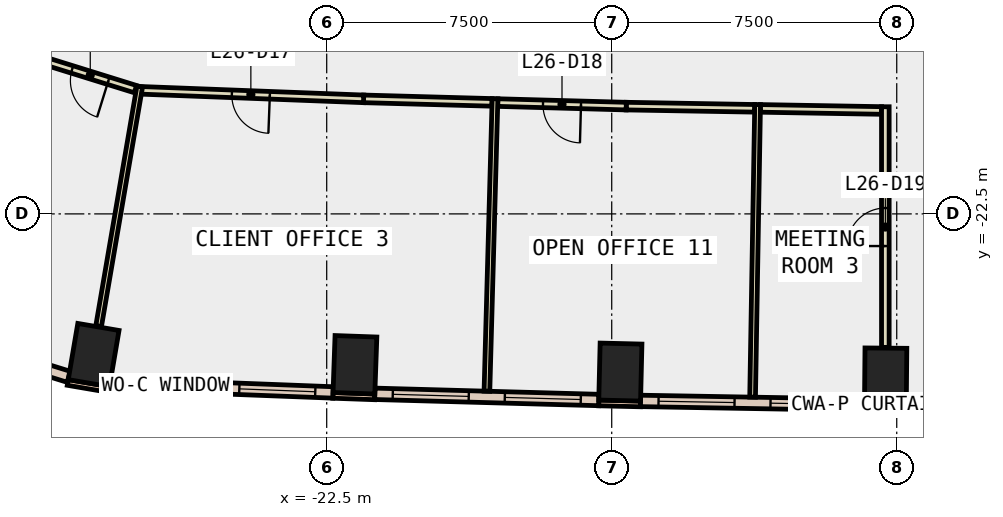
"""IFC4 building model, lengths in metres.
Left out: names, types, materials, properties, quantities, classifications, styles, units other than length and angle.
Written with IfcOpenShell. Run it as: python <this file> out.ifc"""

import sys

from ifc_helpers import new_model, si_unit, direction, frame, frame_2d, origin, origin_2d, place, context, subcontext, project, spatial, rectangle, extrude, element, fill, save


model = new_model("IFC4")
c1 = context("Model", 3, precision=1e-05, world=origin(), true_north=direction((0.0, 1.0)))
c2 = subcontext(c1, "Body", "Model", "MODEL_VIEW")
j1 = project(units=[si_unit("LENGTHUNIT", "METRE"), si_unit("PLANEANGLEUNIT", "RADIAN")], contexts=[c1])
p1 = place(None, origin())
s1 = spatial("IfcSite", under=j1, at=p1, CompositionType="ELEMENT")
p2 = place(p1, origin())
s2 = spatial("IfcBuilding", under=s1, at=p2, CompositionType="ELEMENT")
p3 = place(p2, frame((0.0, 0.0, 120.2)))
s3 = spatial("IfcBuildingStorey", under=s2, at=p3, CompositionType="ELEMENT", Elevation=120.2)
for number, where, z_axis, x_axis in (
    (1, (-28.633, -26.214, -0.4), (0.0, 0.0, 1.0), (-0.986, 0.168, 0.0)),
    (2, (-21.757, -26.47, -0.4), (0.0, 0.0, 1.0), (-0.999, 0.035, 0.0)),
    (3, (-14.773, -26.662, -0.4), (0.0, 0.0, 1.0), (-1.0, 0.024, 0.0)),
    (4, (-7.792, -26.782, -0.4), (0.0, 0.0, 1.0), (-1.0, 0.009, 0.0)),
):
    element("IfcColumn", number, at=place(p3, frame(where, z_axis=z_axis, x_axis=x_axis)), inside=s3, PredefinedType="COLUMN", context=c2, shape_type="SweptSolid", body=[
        extrude(rectangle(XDim=1.1, YDim=1.5, at=origin_2d()), origin(), (0.0, 0.0, 1.0), 4.2),
    ])
p4 = place(p3, frame((-29.314, -26.935, 0.0), z_axis=(0.0, 0.0, 1.0), x_axis=(0.985763338892, -0.168138751323, 0.0)))
e5 = element("IfcWall", 5, at=p4, inside=s3, PredefinedType="STANDARD", context=c2, shape_type="SweptSolid", body=[
    extrude(rectangle(XDim=1.101, YDim=0.15, at=frame_2d((0.55, 0.0))), origin(), (0.0, 0.0, 1.0), 3.8),
])
p5 = place(p3, frame((-22.336, -27.275, 0.0), z_axis=(0.0, 0.0, 1.0), x_axis=(0.999368780235, -0.035525217693, 0.0)))
e6 = element("IfcWall", 6, at=p5, inside=s3, PredefinedType="STANDARD", context=c2, shape_type="SweptSolid", body=[
    extrude(rectangle(XDim=1.1, YDim=0.15, at=frame_2d((0.55, 0.0))), origin(), (0.0, 0.0, 1.0), 3.8),
])
p6 = place(p3, frame((-15.343, -27.474, 0.0), z_axis=(0.0, 0.0, 1.0), x_axis=(0.999723421029, -0.023517683673, 0.0)))
e7 = element("IfcWall", 7, at=p6, inside=s3, PredefinedType="STANDARD", context=c2, shape_type="SweptSolid", body=[
    extrude(rectangle(XDim=1.1, YDim=0.15, at=frame_2d((0.55, 0.0))), origin(), (0.0, 0.0, 1.0), 3.8),
])
p7 = place(p3, frame((-8.349, -27.602, 0.0), z_axis=(0.0, 0.0, 1.0), x_axis=(0.99995860686, -0.009098602504, 0.0)))
e8 = element("IfcWall", 8, at=p7, inside=s3, PredefinedType="STANDARD", context=c2, shape_type="SweptSolid", body=[
    extrude(rectangle(XDim=1.1, YDim=0.15, at=frame_2d((0.55, 0.0))), origin(), (0.0, 0.0, 1.0), 3.8),
])
p8 = place(p3, frame((-28.205, -26.973, 0.0), z_axis=(0.0, 0.0, 1.0), x_axis=(0.999266319694, -0.03829911651, 0.0)))
e9 = element("IfcWall", 9, at=p8, inside=s3, PredefinedType="STANDARD", context=c2, shape_type="SweptSolid", body=[
    extrude(rectangle(XDim=5.877, YDim=0.3, at=frame_2d((2.939, 0.0))), origin(), (0.0, 0.0, 1.0), 3.8),
])
p9 = place(p8, frame((0.469, 0.0, 0.9)))
e10 = element("IfcOpeningElement", 10, at=p9, cuts=e9, PredefinedType="OPENING", context=c2, shape_type="SweptSolid", body=[
    extrude(rectangle(XDim=2.0, YDim=2.6, at=frame_2d((1.0, 1.3))), frame((0.0, 0.16, 0.0), z_axis=(0.0, -1.0, 0.0), x_axis=(1.0, 0.0, 0.0)), (0.0, 0.0, 1.0), 0.32),
])
p10 = place(p8, frame((3.408, 0.0, 0.9)))
e11 = element("IfcOpeningElement", 11, at=p10, cuts=e9, PredefinedType="OPENING", context=c2, shape_type="SweptSolid", body=[
    extrude(rectangle(XDim=2.0, YDim=2.6, at=frame_2d((1.0, 1.3))), frame((0.0, 0.16, 0.0), z_axis=(0.0, -1.0, 0.0), x_axis=(1.0, 0.0, 0.0)), (0.0, 0.0, 1.0), 0.32),
])
p11 = place(p3, frame((-21.235, -27.234, 0.0), z_axis=(0.0, 0.0, 1.0), x_axis=(0.999617542368, -0.027654456983, 0.0)))
e12 = element("IfcWall", 12, at=p11, inside=s3, PredefinedType="STANDARD", context=c2, shape_type="SweptSolid", body=[
    extrude(rectangle(XDim=5.897, YDim=0.3, at=frame_2d((2.949, 0.0))), origin(), (0.0, 0.0, 1.0), 3.8),
])
p12 = place(p11, frame((0.474, 0.0, 0.9)))
e13 = element("IfcOpeningElement", 13, at=p12, cuts=e12, PredefinedType="OPENING", context=c2, shape_type="SweptSolid", body=[
    extrude(rectangle(XDim=2.0, YDim=2.6, at=frame_2d((1.0, 1.3))), frame((0.0, 0.16, 0.0), z_axis=(0.0, -1.0, 0.0), x_axis=(1.0, 0.0, 0.0)), (0.0, 0.0, 1.0), 0.32),
])
p13 = place(p11, frame((3.423, 0.0, 0.9)))
e14 = element("IfcOpeningElement", 14, at=p13, cuts=e12, PredefinedType="OPENING", context=c2, shape_type="SweptSolid", body=[
    extrude(rectangle(XDim=2.0, YDim=2.6, at=frame_2d((1.0, 1.3))), frame((0.0, 0.16, 0.0), z_axis=(0.0, -1.0, 0.0), x_axis=(1.0, 0.0, 0.0)), (0.0, 0.0, 1.0), 0.32),
])
p14 = place(p3, frame((-14.242, -27.421, 0.0), z_axis=(0.0, 0.0, 1.0), x_axis=(0.999850142513, -0.017311629508, 0.0)))
e15 = element("IfcWall", 15, at=p14, inside=s3, PredefinedType="STANDARD", context=c2, shape_type="SweptSolid", body=[
    extrude(rectangle(XDim=5.895, YDim=0.3, at=frame_2d((2.948, 0.0))), origin(), (0.0, 0.0, 1.0), 3.8),
])
p15 = place(p14, frame((0.474, 0.0, 0.9)))
e16 = element("IfcOpeningElement", 16, at=p15, cuts=e15, PredefinedType="OPENING", context=c2, shape_type="SweptSolid", body=[
    extrude(rectangle(XDim=2.0, YDim=2.6, at=frame_2d((1.0, 1.3))), frame((0.0, 0.16, 0.0), z_axis=(0.0, -1.0, 0.0), x_axis=(1.0, 0.0, 0.0)), (0.0, 0.0, 1.0), 0.32),
])
p16 = place(p14, frame((3.421, 0.0, 0.9)))
e17 = element("IfcOpeningElement", 17, at=p16, cuts=e15, PredefinedType="OPENING", context=c2, shape_type="SweptSolid", body=[
    extrude(rectangle(XDim=2.0, YDim=2.6, at=frame_2d((1.0, 1.3))), frame((0.0, 0.16, 0.0), z_axis=(0.0, -1.0, 0.0), x_axis=(1.0, 0.0, 0.0)), (0.0, 0.0, 1.0), 0.32),
])
p17 = place(p3, frame((-33.294, -25.542, 0.0), z_axis=(0.0, 0.0, 1.0), x_axis=(0.954955020021, -0.296750585066, 0.0)))
e18 = element("IfcWall", 18, at=p17, inside=s3, PredefinedType="STANDARD", context=c2, shape_type="SweptSolid", body=[
    extrude(rectangle(XDim=4.196, YDim=0.3, at=frame_2d((2.098, 0.0))), origin(), (0.0, 0.0, 1.0), 3.8),
])
p18 = place(p17, frame((1.398, 0.0, 0.9)))
e19 = element("IfcOpeningElement", 19, at=p18, cuts=e18, PredefinedType="OPENING", context=c2, shape_type="SweptSolid", body=[
    extrude(rectangle(XDim=1.4, YDim=2.6, at=frame_2d((0.7, 1.3))), frame((0.0, 0.16, 0.0), z_axis=(0.0, -1.0, 0.0), x_axis=(1.0, 0.0, 0.0)), (0.0, 0.0, 1.0), 0.32),
])
p19 = place(p3, frame((-27.533, -19.217, 0.0), z_axis=(0.0, 0.0, 1.0), x_axis=(-0.954946345159, 0.296778499671, 0.0)))
e20 = element("IfcWall", 20, at=p19, inside=s3, PredefinedType="PARTITIONING", context=c2, shape_type="SweptSolid", body=[
    extrude(rectangle(XDim=2.49, YDim=0.2, at=frame_2d((1.245, 0.0))), origin(), (0.0, 0.0, 1.0), 3.8),
])
p20 = place(p19, frame((0.745, 0.0, 0.0)))
e21 = element("IfcOpeningElement", 21, at=p20, cuts=e20, PredefinedType="OPENING", context=c2, shape_type="SweptSolid", body=[
    extrude(rectangle(XDim=1.0, YDim=2.1, at=frame_2d((0.5, 1.05))), frame((0.0, 0.11, 0.0), z_axis=(0.0, -1.0, 0.0), x_axis=(1.0, 0.0, 0.0)), (0.0, 0.0, 1.0), 0.22),
])
p21 = place(p3, frame((-18.149, -19.566, 0.0), z_axis=(0.0, 0.0, 1.0), x_axis=(-0.999621568347, 0.027508545868, 0.0)))
e22 = element("IfcWall", 22, at=p21, inside=s3, PredefinedType="PARTITIONING", context=c2, shape_type="SweptSolid", body=[
    extrude(rectangle(XDim=3.381, YDim=0.2, at=frame_2d((1.691, 0.0))), origin(), (0.0, 0.0, 1.0), 3.8),
])
p22 = place(p3, frame((-21.529, -19.473, 0.0), z_axis=(0.0, 0.0, 1.0), x_axis=(-0.999270076349, 0.038200975307, 0.0)))
e23 = element("IfcWall", 23, at=p22, inside=s3, PredefinedType="PARTITIONING", context=c2, shape_type="SweptSolid", body=[
    extrude(rectangle(XDim=5.937, YDim=0.2, at=frame_2d((2.969, 0.0))), origin(), (0.0, 0.0, 1.0), 3.8),
])
p23 = place(p22, frame((2.469, 0.0, 0.0)))
e24 = element("IfcOpeningElement", 24, at=p23, cuts=e23, PredefinedType="OPENING", context=c2, shape_type="SweptSolid", body=[
    extrude(rectangle(XDim=1.0, YDim=2.1, at=frame_2d((0.5, 1.05))), frame((0.0, 0.11, 0.0), z_axis=(0.0, -1.0, 0.0), x_axis=(1.0, 0.0, 0.0)), (0.0, 0.0, 1.0), 0.22),
])
p24 = place(p3, frame((-11.237, -19.722, 0.0), z_axis=(0.0, 0.0, 1.0), x_axis=(-0.999853581081, 0.017111878879, 0.0)))
e25 = element("IfcWall", 25, at=p24, inside=s3, PredefinedType="PARTITIONING", context=c2, shape_type="SweptSolid", body=[
    extrude(rectangle(XDim=3.381, YDim=0.2, at=frame_2d((1.691, 0.0))), origin(), (0.0, 0.0, 1.0), 3.8),
])
p25 = place(p3, frame((-14.618, -19.664, 0.0), z_axis=(0.0, 0.0, 1.0), x_axis=(-0.999621786796, 0.027500606598, 0.0)))
e26 = element("IfcWall", 26, at=p25, inside=s3, PredefinedType="PARTITIONING", context=c2, shape_type="SweptSolid", body=[
    extrude(rectangle(XDim=3.382, YDim=0.2, at=frame_2d((1.691, 0.0))), origin(), (0.0, 0.0, 1.0), 3.8),
])
p26 = place(p25, frame((1.191, 0.0, 0.0)))
e27 = element("IfcOpeningElement", 27, at=p26, cuts=e26, PredefinedType="OPENING", context=c2, shape_type="SweptSolid", body=[
    extrude(rectangle(XDim=1.0, YDim=2.1, at=frame_2d((0.5, 1.05))), frame((0.0, 0.11, 0.0), z_axis=(0.0, -1.0, 0.0), x_axis=(1.0, 0.0, 0.0)), (0.0, 0.0, 1.0), 0.22),
])
p27 = place(p3, frame((-7.9, -19.779, 0.0), z_axis=(0.0, 0.0, 1.0), x_axis=(-0.999851582532, 0.017228259004, 0.0)))
e28 = element("IfcWall", 28, at=p27, inside=s3, PredefinedType="PARTITIONING", context=c2, shape_type="SweptSolid", body=[
    extrude(rectangle(XDim=3.188, YDim=0.2, at=frame_2d((1.594, 0.0))), origin(), (0.0, 0.0, 1.0), 3.8),
])
p28 = place(p3, frame((-7.8, -26.012, 0.0), z_axis=(0.0, 0.0, 1.0), x_axis=(0.0, 1.0, 0.0)))
e29 = element("IfcWall", 29, at=p28, inside=s3, PredefinedType="PARTITIONING", context=c2, shape_type="SweptSolid", body=[
    extrude(rectangle(XDim=6.331, YDim=0.2, at=frame_2d((3.166, 0.0))), origin(), (0.0, 0.0, 1.0), 3.8),
])
p29 = place(p28, frame((2.666, 0.0, 0.0)))
e30 = element("IfcOpeningElement", 30, at=p29, cuts=e29, PredefinedType="OPENING", context=c2, shape_type="SweptSolid", body=[
    extrude(rectangle(XDim=1.0, YDim=2.1, at=frame_2d((0.5, 1.05))), frame((0.0, 0.11, 0.0), z_axis=(0.0, -1.0, 0.0), x_axis=(1.0, 0.0, 0.0)), (0.0, 0.0, 1.0), 0.22),
])
p30 = place(p3, frame((-27.42, -19.148, 0.0), z_axis=(0.0, 0.0, 1.0), x_axis=(-0.169086648341, -0.985601189809, 0.0)))
e31 = element("IfcWall", 31, at=p30, inside=s3, PredefinedType="PARTITIONING", context=c2, shape_type="SweptSolid", body=[
    extrude(rectangle(XDim=6.399, YDim=0.15, at=frame_2d((3.2, 0.0))), origin(), (0.0, 0.0, 1.0), 3.8),
])
p31 = place(p3, frame((-18.071, -19.469, 0.0), z_axis=(0.0, 0.0, 1.0), x_axis=(-0.027648258523, -0.999617713829, 0.0)))
e32 = element("IfcWall", 32, at=p31, inside=s3, PredefinedType="PARTITIONING", context=c2, shape_type="SweptSolid", body=[
    extrude(rectangle(XDim=7.7, YDim=0.15, at=frame_2d((3.85, 0.0))), origin(), (0.0, 0.0, 1.0), 3.8),
])
p32 = place(p3, frame((-11.161, -19.623, 0.0), z_axis=(0.0, 0.0, 1.0), x_axis=(-0.017153017473, -0.999852876173, 0.0)))
e33 = element("IfcWall", 33, at=p32, inside=s3, PredefinedType="PARTITIONING", context=c2, shape_type="SweptSolid", body=[
    extrude(rectangle(XDim=7.7, YDim=0.15, at=frame_2d((3.85, 0.0))), origin(), (0.0, 0.0, 1.0), 3.8),
])
p33 = place(p9, origin())
e34 = element("IfcWindow", 34, at=p33, inside=s3, PartitioningType="SINGLE_PANEL", PredefinedType="WINDOW", context=c2, shape_type="SweptSolid", body=[
    extrude(rectangle(XDim=2.0, YDim=2.6, at=frame_2d((1.0, 1.3))), frame((0.0, 0.03, 0.0), z_axis=(0.0, -1.0, 0.0), x_axis=(1.0, 0.0, 0.0)), (0.0, 0.0, 1.0), 0.06),
])
fill(e10, e34)
p34 = place(p10, origin())
e35 = element("IfcWindow", 35, at=p34, inside=s3, PartitioningType="SINGLE_PANEL", PredefinedType="WINDOW", context=c2, shape_type="SweptSolid", body=[
    extrude(rectangle(XDim=2.0, YDim=2.6, at=frame_2d((1.0, 1.3))), frame((0.0, 0.03, 0.0), z_axis=(0.0, -1.0, 0.0), x_axis=(1.0, 0.0, 0.0)), (0.0, 0.0, 1.0), 0.06),
])
fill(e11, e35)
p35 = place(p12, origin())
e36 = element("IfcWindow", 36, at=p35, inside=s3, PartitioningType="SINGLE_PANEL", PredefinedType="WINDOW", context=c2, shape_type="SweptSolid", body=[
    extrude(rectangle(XDim=2.0, YDim=2.6, at=frame_2d((1.0, 1.3))), frame((0.0, 0.03, 0.0), z_axis=(0.0, -1.0, 0.0), x_axis=(1.0, 0.0, 0.0)), (0.0, 0.0, 1.0), 0.06),
])
fill(e13, e36)
p36 = place(p13, origin())
e37 = element("IfcWindow", 37, at=p36, inside=s3, PartitioningType="SINGLE_PANEL", PredefinedType="WINDOW", context=c2, shape_type="SweptSolid", body=[
    extrude(rectangle(XDim=2.0, YDim=2.6, at=frame_2d((1.0, 1.3))), frame((0.0, 0.03, 0.0), z_axis=(0.0, -1.0, 0.0), x_axis=(1.0, 0.0, 0.0)), (0.0, 0.0, 1.0), 0.06),
])
fill(e14, e37)
p37 = place(p15, origin())
e38 = element("IfcWindow", 38, at=p37, inside=s3, PartitioningType="SINGLE_PANEL", PredefinedType="WINDOW", context=c2, shape_type="SweptSolid", body=[
    extrude(rectangle(XDim=2.0, YDim=2.6, at=frame_2d((1.0, 1.3))), frame((0.0, 0.03, 0.0), z_axis=(0.0, -1.0, 0.0), x_axis=(1.0, 0.0, 0.0)), (0.0, 0.0, 1.0), 0.06),
])
fill(e16, e38)
p38 = place(p16, origin())
e39 = element("IfcWindow", 39, at=p38, inside=s3, PartitioningType="SINGLE_PANEL", PredefinedType="WINDOW", context=c2, shape_type="SweptSolid", body=[
    extrude(rectangle(XDim=2.0, YDim=2.6, at=frame_2d((1.0, 1.3))), frame((0.0, 0.03, 0.0), z_axis=(0.0, -1.0, 0.0), x_axis=(1.0, 0.0, 0.0)), (0.0, 0.0, 1.0), 0.06),
])
fill(e17, e39)
p39 = place(p20, origin())
e40 = element("IfcDoor", 40, at=p39, inside=s3, OperationType="SINGLE_SWING_LEFT", PredefinedType="DOOR", context=c2, shape_type="SweptSolid", body=[
    extrude(rectangle(XDim=1.0, YDim=2.1, at=frame_2d((0.5, 1.05))), frame((0.0, 0.025, 0.0), z_axis=(0.0, -1.0, 0.0), x_axis=(1.0, 0.0, 0.0)), (0.0, 0.0, 1.0), 0.05),
])
fill(e21, e40)
p40 = place(p23, origin())
e41 = element("IfcDoor", 41, at=p40, inside=s3, OperationType="SINGLE_SWING_LEFT", PredefinedType="DOOR", context=c2, shape_type="SweptSolid", body=[
    extrude(rectangle(XDim=1.0, YDim=2.1, at=frame_2d((0.5, 1.05))), frame((0.0, 0.025, 0.0), z_axis=(0.0, -1.0, 0.0), x_axis=(1.0, 0.0, 0.0)), (0.0, 0.0, 1.0), 0.05),
])
fill(e24, e41)
p41 = place(p26, origin())
e42 = element("IfcDoor", 42, at=p41, inside=s3, OperationType="SINGLE_SWING_LEFT", PredefinedType="DOOR", context=c2, shape_type="SweptSolid", body=[
    extrude(rectangle(XDim=1.0, YDim=2.1, at=frame_2d((0.5, 1.05))), frame((0.0, 0.025, 0.0), z_axis=(0.0, -1.0, 0.0), x_axis=(1.0, 0.0, 0.0)), (0.0, 0.0, 1.0), 0.05),
])
fill(e27, e42)
p42 = place(p29, origin())
e43 = element("IfcDoor", 43, at=p42, inside=s3, OperationType="SINGLE_SWING_LEFT", PredefinedType="DOOR", context=c2, shape_type="SweptSolid", body=[
    extrude(rectangle(XDim=1.0, YDim=2.1, at=frame_2d((0.5, 1.05))), frame((0.0, 0.025, 0.0), z_axis=(0.0, -1.0, 0.0), x_axis=(1.0, 0.0, 0.0)), (0.0, 0.0, 1.0), 0.05),
])
fill(e30, e43)
save(model, sys.argv[1])
